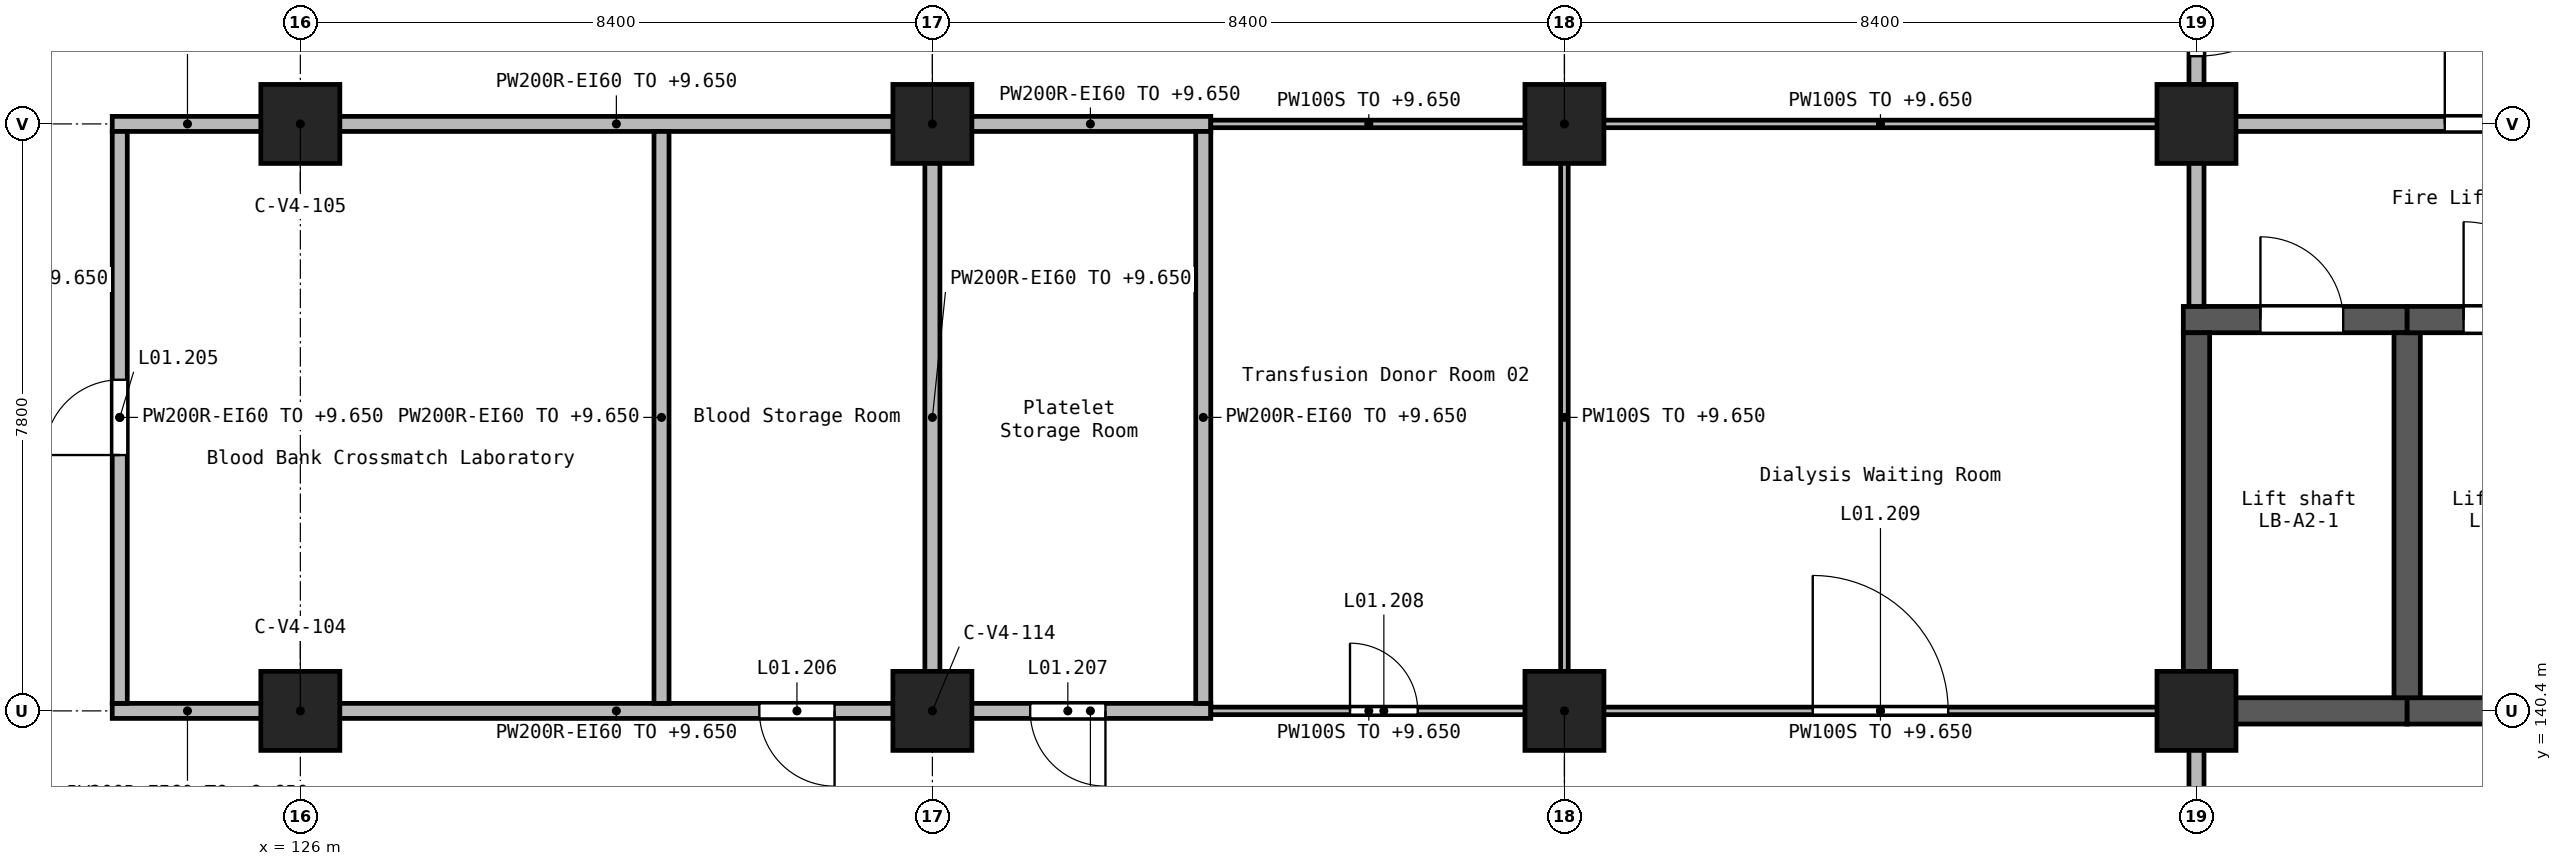
"""IFC4 building model, lengths in metres.
Left out: names, types, materials, properties, quantities, classifications, styles, units other than length and angle.
Written with IfcOpenShell. Run it as: python <this file> out.ifc"""

import sys

from ifc_helpers import new_model, si_unit, direction, frame, frame_2d, origin, origin_2d, place, context, subcontext, project, spatial, rectangle, extrude, element, fill, save


model = new_model("IFC4")
c1 = context("Model", 3, precision=1e-05, world=origin(), true_north=direction((0.0, 1.0)))
c2 = subcontext(c1, "Body", "Model", "MODEL_VIEW")
j1 = project(units=[si_unit("LENGTHUNIT", "METRE"), si_unit("PLANEANGLEUNIT", "RADIAN")], contexts=[c1])
p1 = place(None, origin())
s1 = spatial("IfcSite", under=j1, at=p1, CompositionType="ELEMENT")
p2 = place(p1, origin())
s2 = spatial("IfcBuilding", under=s1, at=p2, CompositionType="ELEMENT")
p3 = place(p2, frame((0.0, 0.0, 5.4)))
s3 = spatial("IfcBuildingStorey", under=s2, at=p3, CompositionType="ELEMENT", Elevation=5.4)
for number, where, z_axis, x_axis in (
    (1, (126.0, 140.4, 0.0), (0.0, 0.0, 1.0), (1.0, 0.0, 0.0)),
    (2, (126.0, 148.2, 0.0), (0.0, 0.0, 1.0), (1.0, 0.0, 0.0)),
    (3, (134.4, 140.4, 0.0), (0.0, 0.0, 1.0), (1.0, 0.0, 0.0)),
    (4, (134.4, 148.2, 0.0), (0.0, 0.0, 1.0), (1.0, 0.0, 0.0)),
    (5, (142.8, 140.4, 0.0), (0.0, 0.0, 1.0), (1.0, 0.0, 0.0)),
    (6, (142.8, 148.2, 0.0), (0.0, 0.0, 1.0), (1.0, 0.0, 0.0)),
    (7, (151.2, 140.4, 0.0), (0.0, 0.0, 1.0), (1.0, 0.0, 0.0)),
    (8, (151.2, 148.2, 0.0), (0.0, 0.0, 1.0), (1.0, 0.0, 0.0)),
):
    element("IfcColumn", number, at=place(p3, frame(where, z_axis=z_axis, x_axis=x_axis)), inside=s3, PredefinedType="COLUMN", context=c2, shape_type="SweptSolid", body=[
        extrude(rectangle(XDim=1.05, YDim=1.05, at=origin_2d()), origin(), (0.0, 0.0, 1.0), 4.5),
    ])
p4 = place(p3, frame((151.025, 145.6, 0.0), z_axis=(0.0, 0.0, 1.0), x_axis=(1.0, 0.0, 0.0)))
e9 = element("IfcWall", 9, at=p4, inside=s3, PredefinedType="SHEAR", context=c2, shape_type="SweptSolid", body=[
    extrude(rectangle(XDim=2.975, YDim=0.35, at=frame_2d((1.488, 0.0))), origin(), (0.0, 0.0, 1.0), 4.5),
])
p5 = place(p4, frame((1.025, 0.0, 0.0)))
e10 = element("IfcOpeningElement", 10, at=p5, cuts=e9, PredefinedType="OPENING", context=c2, shape_type="SweptSolid", body=[
    extrude(rectangle(XDim=1.1, YDim=2.1, at=frame_2d((0.55, 1.05))), frame((0.0, 0.185, 0.0), z_axis=(0.0, -1.0, 0.0), x_axis=(1.0, 0.0, 0.0)), (0.0, 0.0, 1.0), 0.37),
])
p6 = place(p3, frame((151.2, 140.225, 0.0), z_axis=(0.0, 0.0, 1.0), x_axis=(0.0, 1.0, 0.0)))
e11 = element("IfcWall", 11, at=p6, inside=s3, PredefinedType="SHEAR", context=c2, shape_type="SweptSolid", body=[
    extrude(rectangle(XDim=5.2, YDim=0.35, at=frame_2d((2.6, 0.0))), origin(), (0.0, 0.0, 1.0), 4.5),
])
p7 = place(p3, frame((151.375, 140.4, 0.0), z_axis=(0.0, 0.0, 1.0), x_axis=(1.0, 0.0, 0.0)))
e12 = element("IfcWall", 12, at=p7, inside=s3, PredefinedType="SHEAR", context=c2, shape_type="SweptSolid", body=[
    extrude(rectangle(XDim=2.625, YDim=0.35, at=frame_2d((1.312, 0.0))), origin(), (0.0, 0.0, 1.0), 4.5),
])
p8 = place(p3, frame((154.0, 140.4, 0.0), z_axis=(0.0, 0.0, 1.0), x_axis=(1.0, 0.0, 0.0)))
e13 = element("IfcWall", 13, at=p8, inside=s3, PredefinedType="SHEAR", context=c2, shape_type="SweptSolid", body=[
    extrude(rectangle(XDim=2.8, YDim=0.35, at=frame_2d((1.4, 0.0))), origin(), (0.0, 0.0, 1.0), 4.5),
])
p9 = place(p3, frame((154.0, 140.575, 0.0), z_axis=(0.0, 0.0, 1.0), x_axis=(0.0, 1.0, 0.0)))
e14 = element("IfcWall", 14, at=p9, inside=s3, PredefinedType="SHEAR", context=c2, shape_type="SweptSolid", body=[
    extrude(rectangle(XDim=4.85, YDim=0.35, at=frame_2d((2.425, 0.0))), origin(), (0.0, 0.0, 1.0), 4.5),
])
p10 = place(p3, frame((154.0, 145.6, 0.0), z_axis=(0.0, 0.0, 1.0), x_axis=(1.0, 0.0, 0.0)))
e15 = element("IfcWall", 15, at=p10, inside=s3, PredefinedType="SHEAR", context=c2, shape_type="SweptSolid", body=[
    extrude(rectangle(XDim=2.8, YDim=0.35, at=frame_2d((1.4, 0.0))), origin(), (0.0, 0.0, 1.0), 4.5),
])
p11 = place(p10, frame((0.75, 0.0, 0.0)))
e16 = element("IfcOpeningElement", 16, at=p11, cuts=e15, PredefinedType="OPENING", context=c2, shape_type="SweptSolid", body=[
    extrude(rectangle(XDim=1.3, YDim=2.1, at=frame_2d((0.65, 1.05))), frame((0.0, 0.185, 0.0), z_axis=(0.0, -1.0, 0.0), x_axis=(1.0, 0.0, 0.0)), (0.0, 0.0, 1.0), 0.37),
])
p12 = place(p3, frame((138.1, 140.4, 0.0), z_axis=(0.0, 0.0, 1.0), x_axis=(-1.0, 0.0, 0.0)))
e17 = element("IfcWall", 17, at=p12, inside=s3, PredefinedType="SOLIDWALL", context=c2, shape_type="SweptSolid", body=[
    extrude(rectangle(XDim=3.2, YDim=0.2, at=frame_2d((1.6, 0.0))), origin(), (0.0, 0.0, 1.0), 4.25),
])
p13 = place(p12, frame((1.4, 0.0, 0.0)))
e18 = element("IfcOpeningElement", 18, at=p13, cuts=e17, PredefinedType="OPENING", context=c2, shape_type="SweptSolid", body=[
    extrude(rectangle(XDim=1.0, YDim=2.1, at=frame_2d((0.5, 1.05))), frame((0.0, 0.11, 0.0), z_axis=(0.0, -1.0, 0.0), x_axis=(1.0, 0.0, 0.0)), (0.0, 0.0, 1.0), 0.22),
])
p14 = place(p3, frame((133.9, 140.4, 0.0), z_axis=(0.0, 0.0, 1.0), x_axis=(-1.0, 0.0, 0.0)))
e19 = element("IfcWall", 19, at=p14, inside=s3, PredefinedType="SOLIDWALL", context=c2, shape_type="SweptSolid", body=[
    extrude(rectangle(XDim=7.4, YDim=0.2, at=frame_2d((3.7, 0.0))), origin(), (0.0, 0.0, 1.0), 4.25),
])
p15 = place(p14, frame((0.8, 0.0, 0.0)))
e20 = element("IfcOpeningElement", 20, at=p15, cuts=e19, PredefinedType="OPENING", context=c2, shape_type="SweptSolid", body=[
    extrude(rectangle(XDim=1.0, YDim=2.1, at=frame_2d((0.5, 1.05))), frame((0.0, 0.11, 0.0), z_axis=(0.0, -1.0, 0.0), x_axis=(1.0, 0.0, 0.0)), (0.0, 0.0, 1.0), 0.22),
])
p16 = place(p3, frame((125.5, 140.4, 0.0), z_axis=(0.0, 0.0, 1.0), x_axis=(-1.0, 0.0, 0.0)))
e21 = element("IfcWall", 21, at=p16, inside=s3, PredefinedType="SOLIDWALL", context=c2, shape_type="SweptSolid", body=[
    extrude(rectangle(XDim=2.0, YDim=0.2, at=frame_2d((1.0, 0.0))), origin(), (0.0, 0.0, 1.0), 4.25),
])
p17 = place(p3, frame((138.1, 148.2, 0.0), z_axis=(0.0, 0.0, 1.0), x_axis=(-1.0, 0.0, 0.0)))
e22 = element("IfcWall", 22, at=p17, inside=s3, PredefinedType="SOLIDWALL", context=c2, shape_type="SweptSolid", body=[
    extrude(rectangle(XDim=3.2, YDim=0.2, at=frame_2d((1.6, 0.0))), origin(), (0.0, 0.0, 1.0), 4.25),
])
p18 = place(p3, frame((133.9, 148.2, 0.0), z_axis=(0.0, 0.0, 1.0), x_axis=(-1.0, 0.0, 0.0)))
e23 = element("IfcWall", 23, at=p18, inside=s3, PredefinedType="SOLIDWALL", context=c2, shape_type="SweptSolid", body=[
    extrude(rectangle(XDim=7.4, YDim=0.2, at=frame_2d((3.7, 0.0))), origin(), (0.0, 0.0, 1.0), 4.25),
])
p19 = place(p3, frame((125.5, 148.2, 0.0), z_axis=(0.0, 0.0, 1.0), x_axis=(-1.0, 0.0, 0.0)))
e24 = element("IfcWall", 24, at=p19, inside=s3, PredefinedType="SOLIDWALL", context=c2, shape_type="SweptSolid", body=[
    extrude(rectangle(XDim=2.0, YDim=0.2, at=frame_2d((1.0, 0.0))), origin(), (0.0, 0.0, 1.0), 4.25),
])
p20 = place(p3, frame((151.2, 151.3, 0.0), z_axis=(0.0, 0.0, 1.0), x_axis=(0.0, -1.0, 0.0)))
e25 = element("IfcWall", 25, at=p20, inside=s3, PredefinedType="SOLIDWALL", context=c2, shape_type="SweptSolid", body=[
    extrude(rectangle(XDim=2.6, YDim=0.2, at=frame_2d((1.3, 0.0))), origin(), (0.0, 0.0, 1.0), 4.25),
])
p21 = place(p20, frame((0.4, 0.0, 0.0)))
e26 = element("IfcOpeningElement", 26, at=p21, cuts=e25, PredefinedType="OPENING", context=c2, shape_type="SweptSolid", body=[
    extrude(rectangle(XDim=1.8, YDim=2.1, at=frame_2d((0.9, 1.05))), frame((0.0, 0.11, 0.0), z_axis=(0.0, -1.0, 0.0), x_axis=(1.0, 0.0, 0.0)), (0.0, 0.0, 1.0), 0.22),
])
p22 = place(p3, frame((151.2, 147.7, 0.0), z_axis=(0.0, 0.0, 1.0), x_axis=(0.0, -1.0, 0.0)))
e27 = element("IfcWall", 27, at=p22, inside=s3, PredefinedType="SOLIDWALL", context=c2, shape_type="SweptSolid", body=[
    extrude(rectangle(XDim=1.925, YDim=0.2, at=frame_2d((0.962, 0.0))), origin(), (0.0, 0.0, 1.0), 4.25),
])
p23 = place(p3, frame((151.7, 148.2, 0.0), z_axis=(0.0, 0.0, 1.0), x_axis=(1.0, 0.0, 0.0)))
e28 = element("IfcWall", 28, at=p23, inside=s3, PredefinedType="SOLIDWALL", context=c2, shape_type="SweptSolid", body=[
    extrude(rectangle(XDim=7.4, YDim=0.2, at=frame_2d((3.7, 0.0))), origin(), (0.0, 0.0, 1.0), 4.25),
])
p24 = place(p23, frame((2.8, 0.0, 0.0)))
e29 = element("IfcOpeningElement", 29, at=p24, cuts=e28, PredefinedType="OPENING", context=c2, shape_type="SweptSolid", body=[
    extrude(rectangle(XDim=1.8, YDim=2.1, at=frame_2d((0.9, 1.05))), frame((0.0, 0.11, 0.0), z_axis=(0.0, -1.0, 0.0), x_axis=(1.0, 0.0, 0.0)), (0.0, 0.0, 1.0), 0.22),
])
p25 = place(p3, frame((123.6, 140.5, 0.0), z_axis=(0.0, 0.0, 1.0), x_axis=(0.0, 1.0, 0.0)))
e30 = element("IfcWall", 30, at=p25, inside=s3, PredefinedType="SOLIDWALL", context=c2, shape_type="SweptSolid", body=[
    extrude(rectangle(XDim=7.6, YDim=0.2, at=frame_2d((3.8, 0.0))), origin(), (0.0, 0.0, 1.0), 4.25),
])
p26 = place(p25, frame((3.3, 0.0, 0.0)))
e31 = element("IfcOpeningElement", 31, at=p26, cuts=e30, PredefinedType="OPENING", context=c2, shape_type="SweptSolid", body=[
    extrude(rectangle(XDim=1.0, YDim=2.1, at=frame_2d((0.5, 1.05))), frame((0.0, 0.11, 0.0), z_axis=(0.0, -1.0, 0.0), x_axis=(1.0, 0.0, 0.0)), (0.0, 0.0, 1.0), 0.22),
])
p27 = place(p3, frame((130.8, 140.5, 0.0), z_axis=(0.0, 0.0, 1.0), x_axis=(0.0, 1.0, 0.0)))
e32 = element("IfcWall", 32, at=p27, inside=s3, PredefinedType="SOLIDWALL", context=c2, shape_type="SweptSolid", body=[
    extrude(rectangle(XDim=7.6, YDim=0.2, at=frame_2d((3.8, 0.0))), origin(), (0.0, 0.0, 1.0), 4.25),
])
p28 = place(p3, frame((134.4, 140.9, 0.0), z_axis=(0.0, 0.0, 1.0), x_axis=(0.0, 1.0, 0.0)))
e33 = element("IfcWall", 33, at=p28, inside=s3, PredefinedType="SOLIDWALL", context=c2, shape_type="SweptSolid", body=[
    extrude(rectangle(XDim=6.8, YDim=0.2, at=frame_2d((3.4, 0.0))), origin(), (0.0, 0.0, 1.0), 4.25),
])
p29 = place(p3, frame((138.0, 140.5, 0.0), z_axis=(0.0, 0.0, 1.0), x_axis=(0.0, 1.0, 0.0)))
e34 = element("IfcWall", 34, at=p29, inside=s3, PredefinedType="SOLIDWALL", context=c2, shape_type="SweptSolid", body=[
    extrude(rectangle(XDim=7.6, YDim=0.2, at=frame_2d((3.8, 0.0))), origin(), (0.0, 0.0, 1.0), 4.25),
])
p30 = place(p3, frame((151.2, 137.25, 0.0), z_axis=(0.0, 0.0, 1.0), x_axis=(0.0, 1.0, 0.0)))
e35 = element("IfcWall", 35, at=p30, inside=s3, PredefinedType="SOLIDWALL", context=c2, shape_type="SweptSolid", body=[
    extrude(rectangle(XDim=2.65, YDim=0.2, at=frame_2d((1.325, 0.0))), origin(), (0.0, 0.0, 1.0), 4.25),
])
p31 = place(p3, frame((138.1, 140.4, 0.0), z_axis=(0.0, 0.0, 1.0), x_axis=(1.0, 0.0, 0.0)))
e36 = element("IfcWall", 36, at=p31, inside=s3, PredefinedType="PARTITIONING", context=c2, shape_type="SweptSolid", body=[
    extrude(rectangle(XDim=4.2, YDim=0.1, at=frame_2d((2.1, 0.0))), origin(), (0.0, 0.0, 1.0), 4.25),
])
p32 = place(p31, frame((1.85, 0.0, 0.0)))
e37 = element("IfcOpeningElement", 37, at=p32, cuts=e36, PredefinedType="OPENING", context=c2, shape_type="SweptSolid", body=[
    extrude(rectangle(XDim=0.9, YDim=2.1, at=frame_2d((0.45, 1.05))), frame((0.0, 0.06, 0.0), z_axis=(0.0, -1.0, 0.0), x_axis=(1.0, 0.0, 0.0)), (0.0, 0.0, 1.0), 0.12),
])
p33 = place(p3, frame((143.3, 140.4, 0.0), z_axis=(0.0, 0.0, 1.0), x_axis=(1.0, 0.0, 0.0)))
e38 = element("IfcWall", 38, at=p33, inside=s3, PredefinedType="PARTITIONING", context=c2, shape_type="SweptSolid", body=[
    extrude(rectangle(XDim=7.4, YDim=0.1, at=frame_2d((3.7, 0.0))), origin(), (0.0, 0.0, 1.0), 4.25),
])
p34 = place(p33, frame((2.8, 0.0, 0.0)))
e39 = element("IfcOpeningElement", 39, at=p34, cuts=e38, PredefinedType="OPENING", context=c2, shape_type="SweptSolid", body=[
    extrude(rectangle(XDim=1.8, YDim=2.1, at=frame_2d((0.9, 1.05))), frame((0.0, 0.06, 0.0), z_axis=(0.0, -1.0, 0.0), x_axis=(1.0, 0.0, 0.0)), (0.0, 0.0, 1.0), 0.12),
])
p35 = place(p3, frame((138.1, 148.2, 0.0), z_axis=(0.0, 0.0, 1.0), x_axis=(1.0, 0.0, 0.0)))
e40 = element("IfcWall", 40, at=p35, inside=s3, PredefinedType="PARTITIONING", context=c2, shape_type="SweptSolid", body=[
    extrude(rectangle(XDim=4.2, YDim=0.1, at=frame_2d((2.1, 0.0))), origin(), (0.0, 0.0, 1.0), 4.25),
])
p36 = place(p3, frame((143.3, 148.2, 0.0), z_axis=(0.0, 0.0, 1.0), x_axis=(1.0, 0.0, 0.0)))
e41 = element("IfcWall", 41, at=p36, inside=s3, PredefinedType="PARTITIONING", context=c2, shape_type="SweptSolid", body=[
    extrude(rectangle(XDim=7.4, YDim=0.1, at=frame_2d((3.7, 0.0))), origin(), (0.0, 0.0, 1.0), 4.25),
])
p37 = place(p3, frame((142.8, 140.9, 0.0), z_axis=(0.0, 0.0, 1.0), x_axis=(0.0, 1.0, 0.0)))
e42 = element("IfcWall", 42, at=p37, inside=s3, PredefinedType="PARTITIONING", context=c2, shape_type="SweptSolid", body=[
    extrude(rectangle(XDim=6.8, YDim=0.1, at=frame_2d((3.4, 0.0))), origin(), (0.0, 0.0, 1.0), 4.25),
])
p38 = place(p21, frame((1.8, 0.0, 0.0), z_axis=(0.0, 0.0, 1.0), x_axis=(-1.0, 0.0, 0.0)))
e43 = element("IfcDoor", 43, at=p38, inside=s3, OperationType="DOUBLE_DOOR_SINGLE_SWING", PredefinedType="DOOR", context=c2, shape_type="SweptSolid", body=[
    extrude(rectangle(XDim=1.8, YDim=2.1, at=frame_2d((0.9, 1.05))), frame((0.0, 0.025, 0.0), z_axis=(0.0, -1.0, 0.0), x_axis=(1.0, 0.0, 0.0)), (0.0, 0.0, 1.0), 0.05),
])
fill(e26, e43)
p39 = place(p24, frame((1.8, 0.0, 0.0), z_axis=(0.0, 0.0, 1.0), x_axis=(-1.0, 0.0, 0.0)))
e44 = element("IfcDoor", 44, at=p39, inside=s3, OperationType="DOUBLE_DOOR_SINGLE_SWING", PredefinedType="DOOR", context=c2, shape_type="SweptSolid", body=[
    extrude(rectangle(XDim=1.8, YDim=2.1, at=frame_2d((0.9, 1.05))), frame((0.0, 0.025, 0.0), z_axis=(0.0, -1.0, 0.0), x_axis=(1.0, 0.0, 0.0)), (0.0, 0.0, 1.0), 0.05),
])
fill(e29, e44)
p40 = place(p26, frame((1.0, 0.0, 0.0), z_axis=(0.0, 0.0, 1.0), x_axis=(-1.0, 0.0, 0.0)))
e45 = element("IfcDoor", 45, at=p40, inside=s3, OperationType="SINGLE_SWING_RIGHT", PredefinedType="DOOR", context=c2, shape_type="SweptSolid", body=[
    extrude(rectangle(XDim=1.0, YDim=2.1, at=frame_2d((0.5, 1.05))), frame((0.0, 0.025, 0.0), z_axis=(0.0, -1.0, 0.0), x_axis=(1.0, 0.0, 0.0)), (0.0, 0.0, 1.0), 0.05),
])
fill(e31, e45)
p41 = place(p15, frame((1.0, 0.0, 0.0), z_axis=(0.0, 0.0, 1.0), x_axis=(-1.0, 0.0, 0.0)))
e46 = element("IfcDoor", 46, at=p41, inside=s3, OperationType="SINGLE_SWING_RIGHT", PredefinedType="DOOR", context=c2, shape_type="SweptSolid", body=[
    extrude(rectangle(XDim=1.0, YDim=2.1, at=frame_2d((0.5, 1.05))), frame((0.0, 0.025, 0.0), z_axis=(0.0, -1.0, 0.0), x_axis=(1.0, 0.0, 0.0)), (0.0, 0.0, 1.0), 0.05),
])
fill(e20, e46)
p42 = place(p13, frame((1.0, 0.0, 0.0), z_axis=(0.0, 0.0, 1.0), x_axis=(-1.0, 0.0, 0.0)))
e47 = element("IfcDoor", 47, at=p42, inside=s3, OperationType="SINGLE_SWING_LEFT", PredefinedType="DOOR", context=c2, shape_type="SweptSolid", body=[
    extrude(rectangle(XDim=1.0, YDim=2.1, at=frame_2d((0.5, 1.05))), frame((0.0, 0.025, 0.0), z_axis=(0.0, -1.0, 0.0), x_axis=(1.0, 0.0, 0.0)), (0.0, 0.0, 1.0), 0.05),
])
fill(e18, e47)
p43 = place(p32, origin())
e48 = element("IfcDoor", 48, at=p43, inside=s3, OperationType="SINGLE_SWING_RIGHT", PredefinedType="DOOR", context=c2, shape_type="SweptSolid", body=[
    extrude(rectangle(XDim=0.9, YDim=2.1, at=frame_2d((0.45, 1.05))), frame((0.0, 0.025, 0.0), z_axis=(0.0, -1.0, 0.0), x_axis=(1.0, 0.0, 0.0)), (0.0, 0.0, 1.0), 0.05),
])
fill(e37, e48)
p44 = place(p34, origin())
e49 = element("IfcDoor", 49, at=p44, inside=s3, OperationType="DOUBLE_DOOR_SINGLE_SWING", PredefinedType="DOOR", context=c2, shape_type="SweptSolid", body=[
    extrude(rectangle(XDim=1.8, YDim=2.1, at=frame_2d((0.9, 1.05))), frame((0.0, 0.025, 0.0), z_axis=(0.0, -1.0, 0.0), x_axis=(1.0, 0.0, 0.0)), (0.0, 0.0, 1.0), 0.05),
])
fill(e39, e49)
p45 = place(p5, origin())
e50 = element("IfcDoor", 50, at=p45, inside=s3, OperationType="DOUBLE_DOOR_SLIDING", PredefinedType="DOOR", context=c2, shape_type="SweptSolid", body=[
    extrude(rectangle(XDim=1.1, YDim=2.1, at=frame_2d((0.55, 1.05))), frame((0.0, 0.025, 0.0), z_axis=(0.0, -1.0, 0.0), x_axis=(1.0, 0.0, 0.0)), (0.0, 0.0, 1.0), 0.05),
])
fill(e10, e50)
p46 = place(p11, origin())
e51 = element("IfcDoor", 51, at=p46, inside=s3, OperationType="DOUBLE_DOOR_SLIDING", PredefinedType="DOOR", context=c2, shape_type="SweptSolid", body=[
    extrude(rectangle(XDim=1.3, YDim=2.1, at=frame_2d((0.65, 1.05))), frame((0.0, 0.025, 0.0), z_axis=(0.0, -1.0, 0.0), x_axis=(1.0, 0.0, 0.0)), (0.0, 0.0, 1.0), 0.05),
])
fill(e16, e51)
save(model, sys.argv[1])
